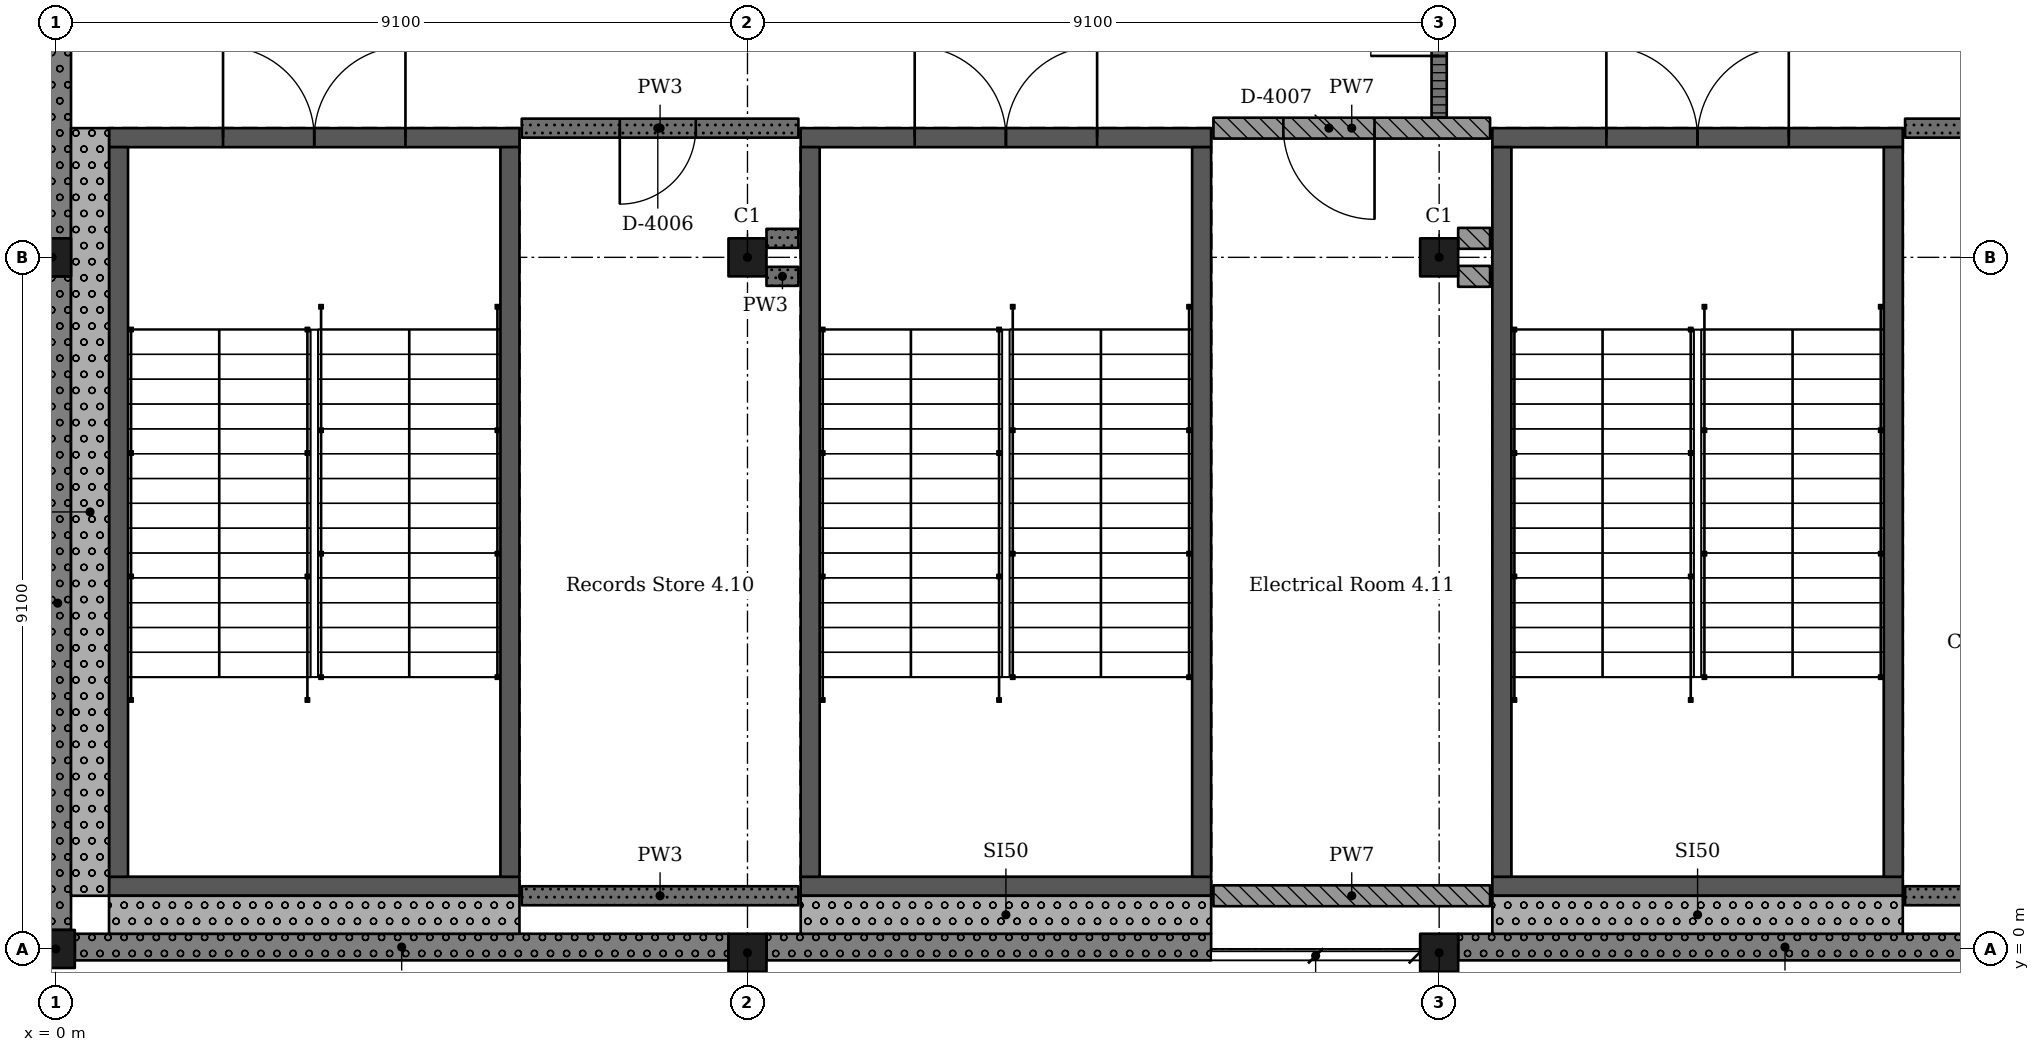
"""IFC4 building model, lengths in metres.
Left out: names, types, materials, properties, quantities, classifications, styles, units other than length and angle.
Written with IfcOpenShell. Run it as: python <this file> out.ifc"""

import sys

from ifc_helpers import new_model, si_unit, direction, frame, frame_2d, origin, origin_2d, place, context, subcontext, project, spatial, rectangle, extrude, element, fill, save


model = new_model("IFC4")
c1 = context("Model", 3, precision=1e-05, world=origin(), true_north=direction((0.0, 1.0)))
c2 = subcontext(c1, "Body", "Model", "MODEL_VIEW")
j1 = project(units=[si_unit("LENGTHUNIT", "METRE"), si_unit("PLANEANGLEUNIT", "RADIAN")], contexts=[c1])
p1 = place(None, origin())
s1 = spatial("IfcSite", under=j1, at=p1, CompositionType="ELEMENT")
p2 = place(p1, origin())
s2 = spatial("IfcBuilding", under=s1, at=p2, CompositionType="ELEMENT")
p3 = place(p2, frame((0.0, 0.0, 20.02)))
s3 = spatial("IfcBuildingStorey", under=s2, at=p3, CompositionType="ELEMENT", Elevation=20.02)
for number, where, z_axis, x_axis in (
    (1, (0.0, 0.0, 0.0), (0.0, 0.0, 1.0), (1.0, 0.0, 0.0)),
    (2, (-0.05, 9.1, 0.0), (0.0, 0.0, 1.0), (1.0, 0.0, 0.0)),
    (3, (9.1, -0.05, 0.0), (0.0, 0.0, 1.0), (1.0, 0.0, 0.0)),
    (4, (9.1, 9.1, 0.0), (0.0, 0.0, 1.0), (1.0, 0.0, 0.0)),
    (5, (18.2, -0.05, 0.0), (0.0, 0.0, 1.0), (1.0, 0.0, 0.0)),
    (6, (18.2, 9.1, 0.0), (0.0, 0.0, 1.0), (1.0, 0.0, 0.0)),
):
    element("IfcColumn", number, at=place(p3, frame(where, z_axis=z_axis, x_axis=x_axis)), inside=s3, PredefinedType="COLUMN", context=c2, shape_type="SweptSolid", body=[
        extrude(rectangle(XDim=0.5, YDim=0.5, at=origin_2d()), origin(), (0.0, 0.0, 1.0), 4.55),
    ])
p4 = place(p3, frame((6.1, 0.825, 0.0), z_axis=(0.0, 0.0, 1.0), x_axis=(-1.0, 0.0, 0.0)))
e7 = element("IfcWall", 7, at=p4, inside=s3, PredefinedType="SHEAR", context=c2, shape_type="SweptSolid", body=[
    extrude(rectangle(XDim=5.4, YDim=0.25, at=frame_2d((2.7, 0.0))), origin(), (0.0, 0.0, 1.0), 4.55),
])
p5 = place(p3, frame((6.1, 10.675, 0.0), z_axis=(0.0, 0.0, 1.0), x_axis=(-1.0, 0.0, 0.0)))
e8 = element("IfcWall", 8, at=p5, inside=s3, PredefinedType="SHEAR", context=c2, shape_type="SweptSolid", body=[
    extrude(rectangle(XDim=5.4, YDim=0.25, at=frame_2d((2.7, 0.0))), origin(), (0.0, 0.0, 1.0), 4.55),
])
p6 = place(p5, frame((1.5, 0.0, 0.0)))
e9 = element("IfcOpeningElement", 9, at=p6, cuts=e8, PredefinedType="OPENING", context=c2, shape_type="SweptSolid", body=[
    extrude(rectangle(XDim=2.4, YDim=2.1, at=frame_2d((1.2, 1.05))), frame((0.0, 0.135, 0.0), z_axis=(0.0, -1.0, 0.0), x_axis=(1.0, 0.0, 0.0)), (0.0, 0.0, 1.0), 0.27),
])
for number, where, z_axis, x_axis in (
    (10, (0.825, 10.55, 0.0), (0.0, 0.0, 1.0), (0.0, -1.0, 0.0)),
    (11, (5.975, 10.55, 0.0), (0.0, 0.0, 1.0), (0.0, -1.0, 0.0)),
):
    element("IfcWall", number, at=place(p3, frame(where, z_axis=z_axis, x_axis=x_axis)), inside=s3, PredefinedType="SHEAR", context=c2, shape_type="SweptSolid", body=[
        extrude(rectangle(XDim=9.6, YDim=0.25, at=frame_2d((4.8, 0.0))), origin(), (0.0, 0.0, 1.0), 4.55),
    ])
p7 = place(p3, frame((15.2, 0.825, 0.0), z_axis=(0.0, 0.0, 1.0), x_axis=(-1.0, 0.0, 0.0)))
e12 = element("IfcWall", 12, at=p7, inside=s3, PredefinedType="SHEAR", context=c2, shape_type="SweptSolid", body=[
    extrude(rectangle(XDim=5.4, YDim=0.25, at=frame_2d((2.7, 0.0))), origin(), (0.0, 0.0, 1.0), 4.55),
])
p8 = place(p3, frame((15.2, 10.675, 0.0), z_axis=(0.0, 0.0, 1.0), x_axis=(-1.0, 0.0, 0.0)))
e13 = element("IfcWall", 13, at=p8, inside=s3, PredefinedType="SHEAR", context=c2, shape_type="SweptSolid", body=[
    extrude(rectangle(XDim=5.4, YDim=0.25, at=frame_2d((2.7, 0.0))), origin(), (0.0, 0.0, 1.0), 4.55),
])
p9 = place(p8, frame((1.5, 0.0, 0.0)))
e14 = element("IfcOpeningElement", 14, at=p9, cuts=e13, PredefinedType="OPENING", context=c2, shape_type="SweptSolid", body=[
    extrude(rectangle(XDim=2.4, YDim=2.1, at=frame_2d((1.2, 1.05))), frame((0.0, 0.135, 0.0), z_axis=(0.0, -1.0, 0.0), x_axis=(1.0, 0.0, 0.0)), (0.0, 0.0, 1.0), 0.27),
])
for number, where, z_axis, x_axis in (
    (15, (9.925, 10.55, 0.0), (0.0, 0.0, 1.0), (0.0, -1.0, 0.0)),
    (16, (15.075, 10.55, 0.0), (0.0, 0.0, 1.0), (0.0, -1.0, 0.0)),
):
    element("IfcWall", number, at=place(p3, frame(where, z_axis=z_axis, x_axis=x_axis)), inside=s3, PredefinedType="SHEAR", context=c2, shape_type="SweptSolid", body=[
        extrude(rectangle(XDim=9.6, YDim=0.25, at=frame_2d((4.8, 0.0))), origin(), (0.0, 0.0, 1.0), 4.55),
    ])
p10 = place(p3, frame((24.3, 0.825, 0.0), z_axis=(0.0, 0.0, 1.0), x_axis=(-1.0, 0.0, 0.0)))
e17 = element("IfcWall", 17, at=p10, inside=s3, PredefinedType="SHEAR", context=c2, shape_type="SweptSolid", body=[
    extrude(rectangle(XDim=5.4, YDim=0.25, at=frame_2d((2.7, 0.0))), origin(), (0.0, 0.0, 1.0), 4.55),
])
p11 = place(p3, frame((24.3, 10.675, 0.0), z_axis=(0.0, 0.0, 1.0), x_axis=(-1.0, 0.0, 0.0)))
e18 = element("IfcWall", 18, at=p11, inside=s3, PredefinedType="SHEAR", context=c2, shape_type="SweptSolid", body=[
    extrude(rectangle(XDim=5.4, YDim=0.25, at=frame_2d((2.7, 0.0))), origin(), (0.0, 0.0, 1.0), 4.55),
])
p12 = place(p11, frame((1.5, 0.0, 0.0)))
e19 = element("IfcOpeningElement", 19, at=p12, cuts=e18, PredefinedType="OPENING", context=c2, shape_type="SweptSolid", body=[
    extrude(rectangle(XDim=2.4, YDim=2.1, at=frame_2d((1.2, 1.05))), frame((0.0, 0.135, 0.0), z_axis=(0.0, -1.0, 0.0), x_axis=(1.0, 0.0, 0.0)), (0.0, 0.0, 1.0), 0.27),
])
for number, where, z_axis, x_axis in (
    (20, (19.025, 10.55, 0.0), (0.0, 0.0, 1.0), (0.0, -1.0, 0.0)),
    (21, (24.175, 10.55, 0.0), (0.0, 0.0, 1.0), (0.0, -1.0, 0.0)),
):
    element("IfcWall", number, at=place(p3, frame(where, z_axis=z_axis, x_axis=x_axis)), inside=s3, PredefinedType="SHEAR", context=c2, shape_type="SweptSolid", body=[
        extrude(rectangle(XDim=9.6, YDim=0.25, at=frame_2d((4.8, 0.0))), origin(), (0.0, 0.0, 1.0), 4.55),
    ])
p13 = place(p3, frame((0.25, 0.025, 0.0), z_axis=(0.0, 0.0, 1.0), x_axis=(1.0, 0.0, 0.0)))
e22 = element("IfcWall", 22, at=p13, inside=s3, PredefinedType="SOLIDWALL", context=c2, shape_type="SweptSolid", body=[
    extrude(rectangle(XDim=8.6, YDim=0.35, at=frame_2d((4.3, 0.0))), origin(), (0.0, 0.0, 1.0), 3.5),
])
p14 = place(p3, frame((9.35, 0.025, 0.0), z_axis=(0.0, 0.0, 1.0), x_axis=(1.0, 0.0, 0.0)))
e23 = element("IfcWall", 23, at=p14, inside=s3, PredefinedType="SOLIDWALL", context=c2, shape_type="SweptSolid", body=[
    extrude(rectangle(XDim=5.85, YDim=0.35, at=frame_2d((2.925, 0.0))), origin(), (0.0, 0.0, 1.0), 3.5),
])
p15 = place(p3, frame((18.45, 0.025, 0.0), z_axis=(0.0, 0.0, 1.0), x_axis=(1.0, 0.0, 0.0)))
e24 = element("IfcWall", 24, at=p15, inside=s3, PredefinedType="SOLIDWALL", context=c2, shape_type="SweptSolid", body=[
    extrude(rectangle(XDim=8.6, YDim=0.35, at=frame_2d((4.3, 0.0))), origin(), (0.0, 0.0, 1.0), 3.5),
])
p16 = place(p3, frame((0.025, 17.925, 0.0), z_axis=(0.0, 0.0, 1.0), x_axis=(0.0, -1.0, 0.0)))
e25 = element("IfcWall", 25, at=p16, inside=s3, PredefinedType="SOLIDWALL", context=c2, shape_type="SweptSolid", body=[
    extrude(rectangle(XDim=8.575, YDim=0.35, at=frame_2d((4.288, 0.0))), origin(), (0.0, 0.0, 1.0), 3.5),
])
p17 = place(p3, frame((0.025, 8.85, 0.0), z_axis=(0.0, 0.0, 1.0), x_axis=(0.0, -1.0, 0.0)))
e26 = element("IfcWall", 26, at=p17, inside=s3, PredefinedType="SOLIDWALL", context=c2, shape_type="SweptSolid", body=[
    extrude(rectangle(XDim=8.6, YDim=0.35, at=frame_2d((4.3, 0.0))), origin(), (0.0, 0.0, 1.0), 3.5),
])
p18 = place(p3, frame((0.7, 0.45, 0.0), z_axis=(0.0, 0.0, 1.0), x_axis=(1.0, 0.0, 0.0)))
e27 = element("IfcWall", 27, at=p18, inside=s3, PredefinedType="SOLIDWALL", context=c2, shape_type="SweptSolid", body=[
    extrude(rectangle(XDim=5.4, YDim=0.5, at=frame_2d((2.7, 0.0))), origin(), (0.0, 0.0, 1.0), 4.25),
])
p19 = place(p3, frame((0.45, 0.7, 0.0), z_axis=(0.0, 0.0, 1.0), x_axis=(0.0, 1.0, 0.0)))
e28 = element("IfcWall", 28, at=p19, inside=s3, PredefinedType="SOLIDWALL", context=c2, shape_type="SweptSolid", body=[
    extrude(rectangle(XDim=10.1, YDim=0.5, at=frame_2d((5.05, 0.0))), origin(), (0.0, 0.0, 1.0), 4.25),
])
p20 = place(p3, frame((9.8, 0.45, 0.0), z_axis=(0.0, 0.0, 1.0), x_axis=(1.0, 0.0, 0.0)))
e29 = element("IfcWall", 29, at=p20, inside=s3, PredefinedType="SOLIDWALL", context=c2, shape_type="SweptSolid", body=[
    extrude(rectangle(XDim=5.4, YDim=0.5, at=frame_2d((2.7, 0.0))), origin(), (0.0, 0.0, 1.0), 4.25),
])
p21 = place(p3, frame((18.9, 0.45, 0.0), z_axis=(0.0, 0.0, 1.0), x_axis=(1.0, 0.0, 0.0)))
e30 = element("IfcWall", 30, at=p21, inside=s3, PredefinedType="SOLIDWALL", context=c2, shape_type="SweptSolid", body=[
    extrude(rectangle(XDim=5.4, YDim=0.5, at=frame_2d((2.7, 0.0))), origin(), (0.0, 0.0, 1.0), 4.25),
])
p22 = place(p3, frame((9.35, 8.85, 0.0), z_axis=(0.0, 0.0, 1.0), x_axis=(1.0, 0.0, 0.0)))
e31 = element("IfcWall", 31, at=p22, inside=s3, PredefinedType="SOLIDWALL", context=c2, shape_type="SweptSolid", body=[
    extrude(rectangle(XDim=0.42, YDim=0.25, at=frame_2d((0.21, 0.0))), origin(), (0.0, 0.0, 1.0), 4.25),
])
p23 = place(p3, frame((9.77, 0.7, 0.0), z_axis=(0.0, 0.0, 1.0), x_axis=(-1.0, 0.0, 0.0)))
e32 = element("IfcWall", 32, at=p23, inside=s3, PredefinedType="SOLIDWALL", context=c2, shape_type="SweptSolid", body=[
    extrude(rectangle(XDim=3.64, YDim=0.25, at=frame_2d((1.82, 0.0))), origin(), (0.0, 0.0, 1.0), 4.25),
])
p24 = place(p3, frame((9.77, 9.35, 0.0), z_axis=(0.0, 0.0, 1.0), x_axis=(-1.0, 0.0, 0.0)))
e33 = element("IfcWall", 33, at=p24, inside=s3, PredefinedType="SOLIDWALL", context=c2, shape_type="SweptSolid", body=[
    extrude(rectangle(XDim=0.42, YDim=0.25, at=frame_2d((0.21, 0.0))), origin(), (0.0, 0.0, 1.0), 4.25),
])
p25 = place(p3, frame((9.77, 10.8, 0.0), z_axis=(0.0, 0.0, 1.0), x_axis=(-1.0, 0.0, 0.0)))
e34 = element("IfcWall", 34, at=p25, inside=s3, PredefinedType="SOLIDWALL", context=c2, shape_type="SweptSolid", body=[
    extrude(rectangle(XDim=3.64, YDim=0.25, at=frame_2d((1.82, 0.0))), origin(), (0.0, 0.0, 1.0), 4.25),
])
p26 = place(p25, frame((1.35, 0.0, 0.0)))
e35 = element("IfcOpeningElement", 35, at=p26, cuts=e34, PredefinedType="OPENING", context=c2, shape_type="SweptSolid", body=[
    extrude(rectangle(XDim=1.0, YDim=2.1, at=frame_2d((0.5, 1.05))), frame((0.0, 0.135, 0.0), z_axis=(0.0, -1.0, 0.0), x_axis=(1.0, 0.0, 0.0)), (0.0, 0.0, 1.0), 0.27),
])
p27 = place(p3, frame((15.23, 10.8, 0.0), z_axis=(0.0, 0.0, 1.0), x_axis=(1.0, 0.0, 0.0)))
e36 = element("IfcWall", 36, at=p27, inside=s3, PredefinedType="SOLIDWALL", context=c2, shape_type="SweptSolid", body=[
    extrude(rectangle(XDim=3.64, YDim=0.275, at=frame_2d((1.82, 0.0))), origin(), (0.0, 0.0, 1.0), 4.25),
])
p28 = place(p27, frame((0.92, 0.0, 0.0)))
e37 = element("IfcOpeningElement", 37, at=p28, cuts=e36, PredefinedType="OPENING", context=c2, shape_type="SweptSolid", body=[
    extrude(rectangle(XDim=1.2, YDim=2.4, at=frame_2d((0.6, 1.2))), frame((0.0, 0.147, 0.0), z_axis=(0.0, -1.0, 0.0), x_axis=(1.0, 0.0, 0.0)), (0.0, 0.0, 1.0), 0.295),
])
p29 = place(p3, frame((18.2, 17.9, 0.0), z_axis=(0.0, 0.0, 1.0), x_axis=(0.0, -1.0, 0.0)))
e38 = element("IfcWall", 38, at=p29, inside=s3, PredefinedType="PARTITIONING", context=c2, shape_type="SweptSolid", body=[
    extrude(rectangle(XDim=6.962, YDim=0.2, at=frame_2d((3.481, 0.0))), origin(), (0.0, 0.0, 1.0), 3.5),
])
p30 = place(p29, frame((0.85, 0.0, 0.0)))
e39 = element("IfcOpeningElement", 39, at=p30, cuts=e38, PredefinedType="OPENING", context=c2, shape_type="SweptSolid", body=[
    extrude(rectangle(XDim=1.8, YDim=2.4, at=frame_2d((0.9, 1.2))), frame((0.0, 0.11, 0.0), z_axis=(0.0, -1.0, 0.0), x_axis=(1.0, 0.0, 0.0)), (0.0, 0.0, 1.0), 0.22),
])
p31 = place(p29, frame((4.35, 0.0, 0.0)))
e40 = element("IfcOpeningElement", 40, at=p31, cuts=e38, PredefinedType="OPENING", context=c2, shape_type="SweptSolid", body=[
    extrude(rectangle(XDim=1.8, YDim=2.4, at=frame_2d((0.9, 1.2))), frame((0.0, 0.11, 0.0), z_axis=(0.0, -1.0, 0.0), x_axis=(1.0, 0.0, 0.0)), (0.0, 0.0, 1.0), 0.22),
])
p32 = place(p3, frame((18.45, 8.85, 0.0), z_axis=(0.0, 0.0, 1.0), x_axis=(1.0, 0.0, 0.0)))
e41 = element("IfcWall", 41, at=p32, inside=s3, PredefinedType="SOLIDWALL", context=c2, shape_type="SweptSolid", body=[
    extrude(rectangle(XDim=0.42, YDim=0.275, at=frame_2d((0.21, 0.0))), origin(), (0.0, 0.0, 1.0), 4.25),
])
p33 = place(p3, frame((18.87, 0.7, 0.0), z_axis=(0.0, 0.0, 1.0), x_axis=(-1.0, 0.0, 0.0)))
e42 = element("IfcWall", 42, at=p33, inside=s3, PredefinedType="SOLIDWALL", context=c2, shape_type="SweptSolid", body=[
    extrude(rectangle(XDim=3.64, YDim=0.275, at=frame_2d((1.82, 0.0))), origin(), (0.0, 0.0, 1.0), 4.25),
])
p34 = place(p3, frame((18.87, 9.35, 0.0), z_axis=(0.0, 0.0, 1.0), x_axis=(-1.0, 0.0, 0.0)))
e43 = element("IfcWall", 43, at=p34, inside=s3, PredefinedType="SOLIDWALL", context=c2, shape_type="SweptSolid", body=[
    extrude(rectangle(XDim=0.42, YDim=0.275, at=frame_2d((0.21, 0.0))), origin(), (0.0, 0.0, 1.0), 4.25),
])
p35 = place(p3, frame((28.2, 10.8, 0.0), z_axis=(0.0, 0.0, 1.0), x_axis=(-1.0, 0.0, 0.0)))
e44 = element("IfcWall", 44, at=p35, inside=s3, PredefinedType="SOLIDWALL", context=c2, shape_type="SweptSolid", body=[
    extrude(rectangle(XDim=3.87, YDim=0.25, at=frame_2d((1.935, 0.0))), origin(), (0.0, 0.0, 1.0), 4.25),
])
p36 = place(p35, frame((1.55, 0.0, 0.0)))
e45 = element("IfcOpeningElement", 45, at=p36, cuts=e44, PredefinedType="OPENING", context=c2, shape_type="SweptSolid", body=[
    extrude(rectangle(XDim=0.8, YDim=2.1, at=frame_2d((0.4, 1.05))), frame((0.0, 0.135, 0.0), z_axis=(0.0, -1.0, 0.0), x_axis=(1.0, 0.0, 0.0)), (0.0, 0.0, 1.0), 0.27),
])
p37 = place(p3, frame((28.225, 0.7, 0.0), z_axis=(0.0, 0.0, 1.0), x_axis=(-1.0, 0.0, 0.0)))
e46 = element("IfcWall", 46, at=p37, inside=s3, PredefinedType="SOLIDWALL", context=c2, shape_type="SweptSolid", body=[
    extrude(rectangle(XDim=3.895, YDim=0.25, at=frame_2d((1.948, 0.0))), origin(), (0.0, 0.0, 1.0), 4.25),
])
p38 = place(p26, origin())
e47 = element("IfcDoor", 47, at=p38, inside=s3, OperationType="SINGLE_SWING_LEFT", PredefinedType="DOOR", context=c2, shape_type="SweptSolid", body=[
    extrude(rectangle(XDim=1.0, YDim=2.1, at=frame_2d((0.5, 1.05))), frame((0.0, 0.025, 0.0), z_axis=(0.0, -1.0, 0.0), x_axis=(1.0, 0.0, 0.0)), (0.0, 0.0, 1.0), 0.05),
])
fill(e35, e47)
p39 = place(p28, origin())
e48 = element("IfcDoor", 48, at=p39, inside=s3, OperationType="SINGLE_SWING_RIGHT", PredefinedType="DOOR", context=c2, shape_type="SweptSolid", body=[
    extrude(rectangle(XDim=1.2, YDim=2.4, at=frame_2d((0.6, 1.2))), frame((0.0, 0.025, 0.0), z_axis=(0.0, -1.0, 0.0), x_axis=(1.0, 0.0, 0.0)), (0.0, 0.0, 1.0), 0.05),
])
fill(e37, e48)
p40 = place(p31, origin())
e49 = element("IfcDoor", 49, at=p40, inside=s3, OperationType="DOUBLE_DOOR_SINGLE_SWING", PredefinedType="DOOR", context=c2, shape_type="SweptSolid", body=[
    extrude(rectangle(XDim=1.8, YDim=2.4, at=frame_2d((0.9, 1.2))), frame((0.0, 0.025, 0.0), z_axis=(0.0, -1.0, 0.0), x_axis=(1.0, 0.0, 0.0)), (0.0, 0.0, 1.0), 0.05),
])
fill(e40, e49)
p41 = place(p6, origin())
e50 = element("IfcDoor", 50, at=p41, inside=s3, OperationType="DOUBLE_DOOR_SINGLE_SWING", PredefinedType="DOOR", context=c2, shape_type="SweptSolid", body=[
    extrude(rectangle(XDim=2.4, YDim=2.1, at=frame_2d((1.2, 1.05))), frame((0.0, 0.025, 0.0), z_axis=(0.0, -1.0, 0.0), x_axis=(1.0, 0.0, 0.0)), (0.0, 0.0, 1.0), 0.05),
])
fill(e9, e50)
p42 = place(p9, origin())
e51 = element("IfcDoor", 51, at=p42, inside=s3, OperationType="DOUBLE_DOOR_SINGLE_SWING", PredefinedType="DOOR", context=c2, shape_type="SweptSolid", body=[
    extrude(rectangle(XDim=2.4, YDim=2.1, at=frame_2d((1.2, 1.05))), frame((0.0, 0.025, 0.0), z_axis=(0.0, -1.0, 0.0), x_axis=(1.0, 0.0, 0.0)), (0.0, 0.0, 1.0), 0.05),
])
fill(e14, e51)
p43 = place(p12, origin())
e52 = element("IfcDoor", 52, at=p43, inside=s3, OperationType="DOUBLE_DOOR_SINGLE_SWING", PredefinedType="DOOR", context=c2, shape_type="SweptSolid", body=[
    extrude(rectangle(XDim=2.4, YDim=2.1, at=frame_2d((1.2, 1.05))), frame((0.0, 0.025, 0.0), z_axis=(0.0, -1.0, 0.0), x_axis=(1.0, 0.0, 0.0)), (0.0, 0.0, 1.0), 0.05),
])
fill(e19, e52)
save(model, sys.argv[1])
